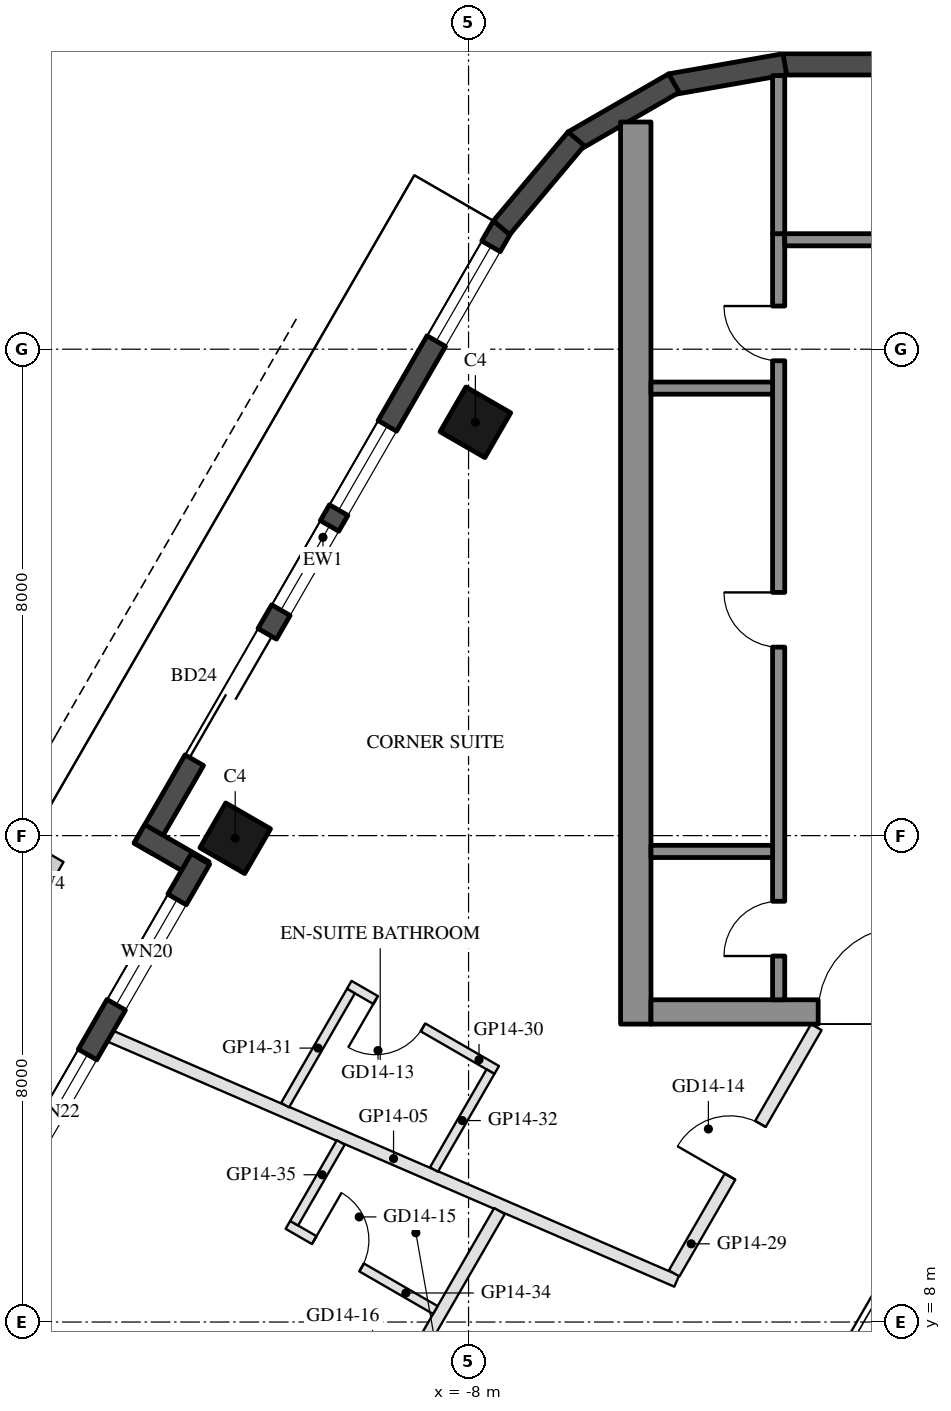
"""IFC4 building model, lengths in metres.
Left out: names, types, materials, properties, quantities, classifications, styles, units other than length and angle.
Written with IfcOpenShell. Run it as: python <this file> out.ifc"""

import sys

from ifc_helpers import new_model, si_unit, direction, frame, frame_2d, origin, origin_2d, place, context, subcontext, project, spatial, rectangle, hollow_rectangle, extrude, element, fill, save


model = new_model("IFC4")
c1 = context("Model", 3, precision=1e-05, world=origin(), true_north=direction((0.0, 1.0)))
c2 = subcontext(c1, "Body", "Model", "MODEL_VIEW")
j1 = project(units=[si_unit("LENGTHUNIT", "METRE"), si_unit("PLANEANGLEUNIT", "RADIAN")], contexts=[c1])
p1 = place(None, origin())
s1 = spatial("IfcSite", under=j1, at=p1, CompositionType="ELEMENT")
p2 = place(p1, origin())
s2 = spatial("IfcBuilding", under=s1, at=p2, CompositionType="ELEMENT")
p3 = place(p2, frame((0.0, 0.0, 161.4)))
s3 = spatial("IfcBuildingStorey", under=s2, at=p3, CompositionType="ELEMENT", Elevation=161.4)
for number, where, z_axis, x_axis in (
    (1, (-7.888, 22.798, 0.0), (0.0, 0.0, 1.0), (0.5, 0.866, 0.0)),
    (2, (-11.838, 15.957, 0.0), (0.0, 0.0, 1.0), (0.5, 0.866, 0.0)),
):
    element("IfcColumn", number, at=place(p3, frame(where, z_axis=z_axis, x_axis=x_axis)), inside=s3, PredefinedType="COLUMN", context=c2, shape_type="SweptSolid", body=[
        extrude(hollow_rectangle(XDim=0.85, YDim=0.85, WallThickness=0.04, at=origin_2d()), origin(), (0.0, 0.0, 1.0), 3.7),
    ])
p4 = place(p3, frame((-7.441, 26.022, 0.0), z_axis=(0.0, 0.0, 1.0), x_axis=(-0.499992533062, -0.86602971478, 0.0)))
e3 = element("IfcWall", 3, at=p4, inside=s3, PredefinedType="SOLIDWALL", context=c2, shape_type="SweptSolid", body=[
    extrude(rectangle(XDim=11.816, YDim=0.35, at=frame_2d((5.908, 0.0))), origin(), (0.0, 0.0, 1.0), 3.55),
])
p5 = place(p4, frame((0.381, 0.0, 0.3)))
e4 = element("IfcOpeningElement", 4, at=p5, cuts=e3, PredefinedType="OPENING", context=c2, shape_type="SweptSolid", body=[
    extrude(rectangle(XDim=1.8, YDim=2.65, at=frame_2d((0.9, 1.325))), frame((0.0, 0.185, 0.0), z_axis=(0.0, -1.0, 0.0), x_axis=(1.0, 0.0, 0.0)), (0.0, 0.0, 1.0), 0.37),
])
p6 = place(p4, frame((7.74, 0.0, 0.0)))
e5 = element("IfcOpeningElement", 5, at=p6, cuts=e3, PredefinedType="OPENING", context=c2, shape_type="SweptSolid", body=[
    extrude(rectangle(XDim=2.4, YDim=2.4, at=frame_2d((1.2, 1.2))), frame((0.0, 0.185, 0.0), z_axis=(0.0, -1.0, 0.0), x_axis=(1.0, 0.0, 0.0)), (0.0, 0.0, 1.0), 0.37),
])
p7 = place(p4, frame((3.791, 0.0, 0.3)))
e6 = element("IfcOpeningElement", 6, at=p7, cuts=e3, PredefinedType="OPENING", context=c2, shape_type="SweptSolid", body=[
    extrude(rectangle(XDim=1.6, YDim=2.65, at=frame_2d((0.8, 1.325))), frame((0.0, 0.185, 0.0), z_axis=(0.0, -1.0, 0.0), x_axis=(1.0, 0.0, 0.0)), (0.0, 0.0, 1.0), 0.37),
])
p8 = place(p4, frame((5.691, 0.0, 0.3)))
e7 = element("IfcOpeningElement", 7, at=p8, cuts=e3, PredefinedType="OPENING", context=c2, shape_type="SweptSolid", body=[
    extrude(rectangle(XDim=1.6, YDim=2.65, at=frame_2d((0.8, 1.325))), frame((0.0, 0.185, 0.0), z_axis=(0.0, -1.0, 0.0), x_axis=(1.0, 0.0, 0.0)), (0.0, 0.0, 1.0), 0.37),
])
p9 = place(p3, frame((-13.413, 16.029, 0.0), z_axis=(0.0, 0.0, 1.0), x_axis=(0.866005645448, -0.500034220881, 0.0)))
e8 = element("IfcWall", 8, at=p9, inside=s3, PredefinedType="SOLIDWALL", context=c2, shape_type="SweptSolid", body=[
    extrude(rectangle(XDim=1.22, YDim=0.35, at=frame_2d((0.61, 0.0))), origin(), (0.0, 0.0, 1.0), 3.55),
])
p10 = place(p3, frame((-12.409, 15.617, 0.0), z_axis=(0.0, 0.0, 1.0), x_axis=(-0.500003597184, -0.866023326939, 0.0)))
e9 = element("IfcWall", 9, at=p10, inside=s3, PredefinedType="SOLIDWALL", context=c2, shape_type="SweptSolid", body=[
    extrude(rectangle(XDim=6.74, YDim=0.35, at=frame_2d((3.37, 0.0))), origin(), (0.0, 0.0, 1.0), 3.55),
])
p11 = place(p10, frame((0.77, 0.0, 0.3)))
e10 = element("IfcOpeningElement", 10, at=p11, cuts=e9, PredefinedType="OPENING", context=c2, shape_type="SweptSolid", body=[
    extrude(rectangle(XDim=2.0, YDim=2.65, at=frame_2d((1.0, 1.325))), frame((0.0, 0.185, 0.0), z_axis=(0.0, -1.0, 0.0), x_axis=(1.0, 0.0, 0.0)), (0.0, 0.0, 1.0), 0.37),
])
p12 = place(p10, frame((3.715, 0.0, 0.3)))
e11 = element("IfcOpeningElement", 11, at=p12, cuts=e9, PredefinedType="OPENING", context=c2, shape_type="SweptSolid", body=[
    extrude(rectangle(XDim=2.2, YDim=2.65, at=frame_2d((1.1, 1.325))), frame((0.0, 0.185, 0.0), z_axis=(0.0, -1.0, 0.0), x_axis=(1.0, 0.0, 0.0)), (0.0, 0.0, 1.0), 0.37),
])
p13 = place(p3, frame((2.829, 28.685, 0.0), z_axis=(0.0, 0.0, 1.0), x_axis=(-1.0, 0.0, 0.0)))
e12 = element("IfcWall", 12, at=p13, inside=s3, PredefinedType="SOLIDWALL", context=c2, shape_type="SweptSolid", body=[
    extrude(rectangle(XDim=5.658, YDim=0.35, at=frame_2d((2.829, 0.0))), origin(), (0.0, 0.0, 1.0), 3.55),
])
for number, where, z_axis, x_axis in (
    (13, (-2.799, 28.688, 0.0), (0.0, 0.0, 1.0), (-0.985, -0.174, 0.0)),
    (14, (-4.623, 28.377, 0.0), (0.0, 0.0, 1.0), (-0.866, -0.5, 0.0)),
):
    element("IfcWall", number, at=place(p3, frame(where, z_axis=z_axis, x_axis=x_axis)), inside=s3, PredefinedType="SOLIDWALL", context=c2, shape_type="SweptSolid", body=[
        extrude(rectangle(XDim=1.91, YDim=0.35, at=frame_2d((0.955, 0.0))), origin(), (0.0, 0.0, 1.0), 3.55),
    ])
p14 = place(p3, frame((-6.23, 27.461, 0.0), z_axis=(0.0, 0.0, 1.0), x_axis=(-0.642808304945, -0.766027077259, 0.0)))
e15 = element("IfcWall", 15, at=p14, inside=s3, PredefinedType="SOLIDWALL", context=c2, shape_type="SweptSolid", body=[
    extrude(rectangle(XDim=1.91, YDim=0.35, at=frame_2d((0.955, 0.0))), origin(), (0.0, 0.0, 1.0), 3.55),
])
p15 = place(p3, frame((-5.25, 12.9, 0.0), z_axis=(0.0, 0.0, 1.0), x_axis=(0.0, 1.0, 0.0)))
e16 = element("IfcWall", 16, at=p15, inside=s3, PredefinedType="SHEAR", context=c2, shape_type="SweptSolid", body=[
    extrude(rectangle(XDim=14.837, YDim=0.5, at=frame_2d((7.418, 0.0))), origin(), (0.0, 0.0, 1.0), 3.5),
])
p16 = place(p3, frame((5.0, 13.1, 0.0), z_axis=(0.0, 0.0, 1.0), x_axis=(-1.0, 0.0, 0.0)))
e17 = element("IfcWall", 17, at=p16, inside=s3, PredefinedType="SHEAR", context=c2, shape_type="SweptSolid", body=[
    extrude(rectangle(XDim=10.0, YDim=0.4, at=frame_2d((5.0, 0.0))), origin(), (0.0, 0.0, 1.0), 3.5),
])
p17 = place(p16, frame((3.55, 0.0, 0.0)))
e18 = element("IfcOpeningElement", 18, at=p17, cuts=e17, PredefinedType="OPENING", context=c2, shape_type="SweptSolid", body=[
    extrude(rectangle(XDim=1.1, YDim=2.1, at=frame_2d((0.55, 1.05))), frame((0.0, 0.21, 0.0), z_axis=(0.0, -1.0, 0.0), x_axis=(1.0, 0.0, 0.0)), (0.0, 0.0, 1.0), 0.42),
])
p18 = place(p16, frame((5.85, 0.0, 0.0)))
e19 = element("IfcOpeningElement", 19, at=p18, cuts=e17, PredefinedType="OPENING", context=c2, shape_type="SweptSolid", body=[
    extrude(rectangle(XDim=1.4, YDim=2.1, at=frame_2d((0.7, 1.05))), frame((0.0, 0.21, 0.0), z_axis=(0.0, -1.0, 0.0), x_axis=(1.0, 0.0, 0.0)), (0.0, 0.0, 1.0), 0.42),
])
p19 = place(p3, frame((-2.9, 13.3, 0.0), z_axis=(0.0, 0.0, 1.0), x_axis=(0.0, 1.0, 0.0)))
e20 = element("IfcWall", 20, at=p19, inside=s3, PredefinedType="SHEAR", context=c2, shape_type="SweptSolid", body=[
    extrude(rectangle(XDim=12.6, YDim=0.2, at=frame_2d((6.3, 0.0))), origin(), (0.0, 0.0, 1.0), 3.5),
])
p20 = place(p19, frame((0.72, 0.0, 0.0)))
e21 = element("IfcOpeningElement", 21, at=p20, cuts=e20, PredefinedType="OPENING", context=c2, shape_type="SweptSolid", body=[
    extrude(rectangle(XDim=0.9, YDim=2.1, at=frame_2d((0.45, 1.05))), frame((0.0, 0.11, 0.0), z_axis=(0.0, -1.0, 0.0), x_axis=(1.0, 0.0, 0.0)), (0.0, 0.0, 1.0), 0.22),
])
p21 = place(p19, frame((5.8, 0.0, 0.0)))
e22 = element("IfcOpeningElement", 22, at=p21, cuts=e20, PredefinedType="OPENING", context=c2, shape_type="SweptSolid", body=[
    extrude(rectangle(XDim=0.9, YDim=2.1, at=frame_2d((0.45, 1.05))), frame((0.0, 0.11, 0.0), z_axis=(0.0, -1.0, 0.0), x_axis=(1.0, 0.0, 0.0)), (0.0, 0.0, 1.0), 0.22),
])
p22 = place(p19, frame((10.51, 0.0, 0.0)))
e23 = element("IfcOpeningElement", 23, at=p22, cuts=e20, PredefinedType="OPENING", context=c2, shape_type="SweptSolid", body=[
    extrude(rectangle(XDim=0.9, YDim=2.1, at=frame_2d((0.45, 1.05))), frame((0.0, 0.11, 0.0), z_axis=(0.0, -1.0, 0.0), x_axis=(1.0, 0.0, 0.0)), (0.0, 0.0, 1.0), 0.22),
])
p23 = place(p3, frame((-0.4, 25.8, 0.0), z_axis=(0.0, 0.0, 1.0), x_axis=(-1.0, 0.0, 0.0)))
e24 = element("IfcWall", 24, at=p23, inside=s3, PredefinedType="SHEAR", context=c2, shape_type="SweptSolid", body=[
    extrude(rectangle(XDim=2.4, YDim=0.2, at=frame_2d((1.2, 0.0))), origin(), (0.0, 0.0, 1.0), 3.5),
])
for number, where, z_axis, x_axis in (
    (25, (-3.0, 15.74, 0.0), (0.0, 0.0, 1.0), (-1.0, 0.0, 0.0)),
    (26, (-3.0, 23.36, 0.0), (0.0, 0.0, 1.0), (-1.0, 0.0, 0.0)),
):
    element("IfcWall", number, at=place(p3, frame(where, z_axis=z_axis, x_axis=x_axis)), inside=s3, PredefinedType="SHEAR", context=c2, shape_type="SweptSolid", body=[
        extrude(rectangle(XDim=2.0, YDim=0.2, at=frame_2d((1.0, 0.0))), origin(), (0.0, 0.0, 1.0), 3.5),
    ])
p24 = place(p3, frame((-2.9, 25.9, 0.0), z_axis=(0.0, 0.0, 1.0), x_axis=(0.0, 1.0, 0.0)))
e27 = element("IfcWall", 27, at=p24, inside=s3, PredefinedType="SHEAR", context=c2, shape_type="SweptSolid", body=[
    extrude(rectangle(XDim=2.6, YDim=0.2, at=frame_2d((1.3, 0.0))), origin(), (0.0, 0.0, 1.0), 3.5),
])
p25 = place(p3, frame((-13.89, 12.701, 0.0), z_axis=(0.0, 0.0, 1.0), x_axis=(0.917850876745, -0.396925393566, 0.0)))
e28 = element("IfcWall", 28, at=p25, inside=s3, PredefinedType="PARTITIONING", context=c2, shape_type="SweptSolid", body=[
    extrude(rectangle(XDim=10.147, YDim=0.2, at=frame_2d((5.074, 0.0))), origin(), (0.0, 0.0, 1.0), 2.95),
])
p26 = place(p3, frame((-4.618, 8.801, 0.0), z_axis=(0.0, 0.0, 1.0), x_axis=(0.499980071345, 0.866036909293, 0.0)))
e29 = element("IfcWall", 29, at=p26, inside=s3, PredefinedType="PARTITIONING", context=c2, shape_type="SweptSolid", body=[
    extrude(rectangle(XDim=4.676, YDim=0.2, at=frame_2d((2.338, 0.0))), origin(), (0.0, 0.0, 1.0), 2.95),
])
p27 = place(p26, frame((1.838, 0.0, 0.0)))
e30 = element("IfcOpeningElement", 30, at=p27, cuts=e29, PredefinedType="OPENING", context=c2, shape_type="SweptSolid", body=[
    extrude(rectangle(XDim=1.0, YDim=2.1, at=frame_2d((0.5, 1.05))), frame((0.0, 0.11, 0.0), z_axis=(0.0, -1.0, 0.0), x_axis=(1.0, 0.0, 0.0)), (0.0, 0.0, 1.0), 0.22),
])
p28 = place(p3, frame((-7.537, 12.146, 0.0), z_axis=(0.0, 0.0, 1.0), x_axis=(-0.866034573852, 0.49998411664, 0.0)))
e31 = element("IfcWall", 31, at=p28, inside=s3, PredefinedType="PARTITIONING", context=c2, shape_type="SweptSolid", body=[
    extrude(rectangle(XDim=2.8, YDim=0.15, at=frame_2d((1.4, 0.0))), origin(), (0.0, 0.0, 1.0), 3.55),
])
p29 = place(p28, frame((1.4, 0.0, 0.0)))
e32 = element("IfcOpeningElement", 32, at=p29, cuts=e31, PredefinedType="OPENING", context=c2, shape_type="SweptSolid", body=[
    extrude(rectangle(XDim=0.9, YDim=2.1, at=frame_2d((0.45, 1.05))), frame((0.0, 0.085, 0.0), z_axis=(0.0, -1.0, 0.0), x_axis=(1.0, 0.0, 0.0)), (0.0, 0.0, 1.0), 0.17),
])
p30 = place(p3, frame((-9.934, 13.443, 0.0), z_axis=(0.0, 0.0, 1.0), x_axis=(-0.500018419339, -0.866014769113, 0.0)))
e33 = element("IfcWall", 33, at=p30, inside=s3, PredefinedType="PARTITIONING", context=c2, shape_type="SweptSolid", body=[
    extrude(rectangle(XDim=2.166, YDim=0.15, at=frame_2d((1.083, 0.0))), origin(), (0.0, 0.0, 1.0), 3.55),
])
p31 = place(p3, frame((-7.639, 12.118, 0.0), z_axis=(0.0, 0.0, 1.0), x_axis=(-0.500052179009, -0.865995276124, 0.0)))
e34 = element("IfcWall", 34, at=p31, inside=s3, PredefinedType="PARTITIONING", context=c2, shape_type="SweptSolid", body=[
    extrude(rectangle(XDim=1.859, YDim=0.15, at=frame_2d((0.929, 0.0))), origin(), (0.0, 0.0, 1.0), 3.55),
])
p32 = place(p3, frame((-12.823, 0.591, 0.0), z_axis=(0.0, 0.0, 1.0), x_axis=(0.500005210312, 0.866022395588, 0.0)))
e35 = element("IfcWall", 35, at=p32, inside=s3, PredefinedType="PARTITIONING", context=c2, shape_type="SweptSolid", body=[
    extrude(rectangle(XDim=10.663, YDim=0.2, at=frame_2d((5.332, 0.0))), origin(), (0.0, 0.0, 1.0), 2.95),
])
p33 = place(p32, frame((7.201, 0.0, 0.0)))
e36 = element("IfcOpeningElement", 36, at=p33, cuts=e35, PredefinedType="OPENING", context=c2, shape_type="SweptSolid", body=[
    extrude(rectangle(XDim=1.0, YDim=2.1, at=frame_2d((0.5, 1.05))), frame((0.0, 0.11, 0.0), z_axis=(0.0, -1.0, 0.0), x_axis=(1.0, 0.0, 0.0)), (0.0, 0.0, 1.0), 0.22),
])
p34 = place(p3, frame((-10.971, 9.598, 0.0), z_axis=(0.0, 0.0, 1.0), x_axis=(0.865996816683, -0.500049511043, 0.0)))
e37 = element("IfcWall", 37, at=p34, inside=s3, PredefinedType="PARTITIONING", context=c2, shape_type="SweptSolid", body=[
    extrude(rectangle(XDim=2.8, YDim=0.15, at=frame_2d((1.4, 0.0))), origin(), (0.0, 0.0, 1.0), 3.55),
])
p35 = place(p34, frame((0.5, 0.0, 0.0)))
e38 = element("IfcOpeningElement", 38, at=p35, cuts=e37, PredefinedType="OPENING", context=c2, shape_type="SweptSolid", body=[
    extrude(rectangle(XDim=0.9, YDim=2.1, at=frame_2d((0.45, 1.05))), frame((0.0, 0.085, 0.0), z_axis=(0.0, -1.0, 0.0), x_axis=(1.0, 0.0, 0.0)), (0.0, 0.0, 1.0), 0.17),
])
p36 = place(p3, frame((-10.102, 10.954, 0.0), z_axis=(0.0, 0.0, 1.0), x_axis=(-0.499956687145, -0.866050409029, 0.0)))
e39 = element("IfcWall", 39, at=p36, inside=s3, PredefinedType="PARTITIONING", context=c2, shape_type="SweptSolid", body=[
    extrude(rectangle(XDim=1.534, YDim=0.15, at=frame_2d((0.767, 0.0))), origin(), (0.0, 0.0, 1.0), 2.95),
])
p37 = place(p5, origin())
e40 = element("IfcWindow", 40, at=p37, inside=s3, PartitioningType="SINGLE_PANEL", PredefinedType="WINDOW", context=c2, shape_type="SweptSolid", body=[
    extrude(rectangle(XDim=1.8, YDim=2.65, at=frame_2d((0.9, 1.325))), frame((0.0, 0.03, 0.0), z_axis=(0.0, -1.0, 0.0), x_axis=(1.0, 0.0, 0.0)), (0.0, 0.0, 1.0), 0.06),
])
fill(e4, e40)
p38 = place(p6, frame((2.4, 0.0, 0.0), z_axis=(0.0, 0.0, 1.0), x_axis=(-1.0, 0.0, 0.0)))
e41 = element("IfcDoor", 41, at=p38, inside=s3, OperationType="SLIDING_TO_LEFT", PredefinedType="DOOR", context=c2, shape_type="SweptSolid", body=[
    extrude(rectangle(XDim=2.4, YDim=2.4, at=frame_2d((1.2, 1.2))), frame((0.0, 0.025, 0.0), z_axis=(0.0, -1.0, 0.0), x_axis=(1.0, 0.0, 0.0)), (0.0, 0.0, 1.0), 0.05),
])
fill(e5, e41)
p39 = place(p7, origin())
e42 = element("IfcWindow", 42, at=p39, inside=s3, PartitioningType="SINGLE_PANEL", PredefinedType="WINDOW", context=c2, shape_type="SweptSolid", body=[
    extrude(rectangle(XDim=1.6, YDim=2.65, at=frame_2d((0.8, 1.325))), frame((0.0, 0.03, 0.0), z_axis=(0.0, -1.0, 0.0), x_axis=(1.0, 0.0, 0.0)), (0.0, 0.0, 1.0), 0.06),
])
fill(e6, e42)
p40 = place(p8, origin())
e43 = element("IfcWindow", 43, at=p40, inside=s3, PartitioningType="SINGLE_PANEL", PredefinedType="WINDOW", context=c2, shape_type="SweptSolid", body=[
    extrude(rectangle(XDim=1.6, YDim=2.65, at=frame_2d((0.8, 1.325))), frame((0.0, 0.03, 0.0), z_axis=(0.0, -1.0, 0.0), x_axis=(1.0, 0.0, 0.0)), (0.0, 0.0, 1.0), 0.06),
])
fill(e7, e43)
p41 = place(p11, origin())
e44 = element("IfcWindow", 44, at=p41, inside=s3, PartitioningType="SINGLE_PANEL", PredefinedType="WINDOW", context=c2, shape_type="SweptSolid", body=[
    extrude(rectangle(XDim=2.0, YDim=2.65, at=frame_2d((1.0, 1.325))), frame((0.0, 0.03, 0.0), z_axis=(0.0, -1.0, 0.0), x_axis=(1.0, 0.0, 0.0)), (0.0, 0.0, 1.0), 0.06),
])
fill(e10, e44)
p42 = place(p12, origin())
e45 = element("IfcWindow", 45, at=p42, inside=s3, PartitioningType="SINGLE_PANEL", PredefinedType="WINDOW", context=c2, shape_type="SweptSolid", body=[
    extrude(rectangle(XDim=2.2, YDim=2.65, at=frame_2d((1.1, 1.325))), frame((0.0, 0.03, 0.0), z_axis=(0.0, -1.0, 0.0), x_axis=(1.0, 0.0, 0.0)), (0.0, 0.0, 1.0), 0.06),
])
fill(e11, e45)
p43 = place(p20, origin())
e46 = element("IfcDoor", 46, at=p43, inside=s3, OperationType="SINGLE_SWING_LEFT", PredefinedType="DOOR", context=c2, shape_type="SweptSolid", body=[
    extrude(rectangle(XDim=0.9, YDim=2.1, at=frame_2d((0.45, 1.05))), frame((0.0, 0.025, 0.0), z_axis=(0.0, -1.0, 0.0), x_axis=(1.0, 0.0, 0.0)), (0.0, 0.0, 1.0), 0.05),
])
fill(e21, e46)
p44 = place(p21, origin())
e47 = element("IfcDoor", 47, at=p44, inside=s3, OperationType="SINGLE_SWING_RIGHT", PredefinedType="DOOR", context=c2, shape_type="SweptSolid", body=[
    extrude(rectangle(XDim=0.9, YDim=2.1, at=frame_2d((0.45, 1.05))), frame((0.0, 0.025, 0.0), z_axis=(0.0, -1.0, 0.0), x_axis=(1.0, 0.0, 0.0)), (0.0, 0.0, 1.0), 0.05),
])
fill(e22, e47)
p45 = place(p22, origin())
e48 = element("IfcDoor", 48, at=p45, inside=s3, OperationType="SINGLE_SWING_RIGHT", PredefinedType="DOOR", context=c2, shape_type="SweptSolid", body=[
    extrude(rectangle(XDim=0.9, YDim=2.1, at=frame_2d((0.45, 1.05))), frame((0.0, 0.025, 0.0), z_axis=(0.0, -1.0, 0.0), x_axis=(1.0, 0.0, 0.0)), (0.0, 0.0, 1.0), 0.05),
])
fill(e23, e48)
p46 = place(p18, frame((1.4, 0.0, 0.0), z_axis=(0.0, 0.0, 1.0), x_axis=(-1.0, 0.0, 0.0)))
e49 = element("IfcDoor", 49, at=p46, inside=s3, OperationType="DOUBLE_DOOR_SINGLE_SWING", PredefinedType="DOOR", context=c2, shape_type="SweptSolid", body=[
    extrude(rectangle(XDim=1.4, YDim=2.1, at=frame_2d((0.7, 1.05))), frame((0.0, 0.025, 0.0), z_axis=(0.0, -1.0, 0.0), x_axis=(1.0, 0.0, 0.0)), (0.0, 0.0, 1.0), 0.05),
])
fill(e19, e49)
p47 = place(p29, origin())
e50 = element("IfcDoor", 50, at=p47, inside=s3, OperationType="SINGLE_SWING_RIGHT", PredefinedType="DOOR", context=c2, shape_type="SweptSolid", body=[
    extrude(rectangle(XDim=0.9, YDim=2.1, at=frame_2d((0.45, 1.05))), frame((0.0, 0.025, 0.0), z_axis=(0.0, -1.0, 0.0), x_axis=(1.0, 0.0, 0.0)), (0.0, 0.0, 1.0), 0.05),
])
fill(e32, e50)
p48 = place(p27, origin())
e51 = element("IfcDoor", 51, at=p48, inside=s3, OperationType="SINGLE_SWING_LEFT", PredefinedType="DOOR", context=c2, shape_type="SweptSolid", body=[
    extrude(rectangle(XDim=1.0, YDim=2.1, at=frame_2d((0.5, 1.05))), frame((0.0, 0.025, 0.0), z_axis=(0.0, -1.0, 0.0), x_axis=(1.0, 0.0, 0.0)), (0.0, 0.0, 1.0), 0.05),
])
fill(e30, e51)
p49 = place(p35, origin())
e52 = element("IfcDoor", 52, at=p49, inside=s3, OperationType="SINGLE_SWING_LEFT", PredefinedType="DOOR", context=c2, shape_type="SweptSolid", body=[
    extrude(rectangle(XDim=0.9, YDim=2.1, at=frame_2d((0.45, 1.05))), frame((0.0, 0.025, 0.0), z_axis=(0.0, -1.0, 0.0), x_axis=(1.0, 0.0, 0.0)), (0.0, 0.0, 1.0), 0.05),
])
fill(e38, e52)
save(model, sys.argv[1])
